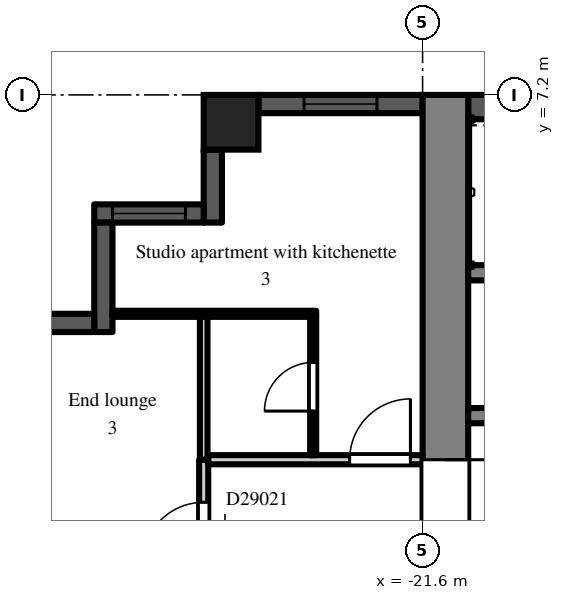
"""IFC4 building model, lengths in metres.
Left out: names, types, materials, properties, quantities, classifications, styles, units other than length and angle.
Written with IfcOpenShell. Run it as: python <this file> out.ifc"""

import sys

from ifc_helpers import new_model, si_unit, direction, frame, frame_2d, origin, origin_2d, place, context, subcontext, project, spatial, rectangle, extrude, element, fill, save


model = new_model("IFC4")
c1 = context("Model", 3, precision=1e-05, world=origin(), true_north=direction((0.0, 1.0)))
c2 = subcontext(c1, "Body", "Model", "MODEL_VIEW")
j1 = project(units=[si_unit("LENGTHUNIT", "METRE"), si_unit("PLANEANGLEUNIT", "RADIAN")], contexts=[c1])
p1 = place(None, origin())
s1 = spatial("IfcSite", under=j1, at=p1, CompositionType="ELEMENT")
p2 = place(p1, origin())
s2 = spatial("IfcBuilding", under=s1, at=p2, CompositionType="ELEMENT")
p3 = place(p2, frame((0.0, 0.0, 201.9)))
s3 = spatial("IfcBuildingStorey", under=s2, at=p3, CompositionType="ELEMENT", Elevation=201.9)
p4 = place(p3, frame((-24.75, 6.75, 0.0), z_axis=(0.0, 0.0, 1.0), x_axis=(1.0, 0.0, 0.0)))
e1 = element("IfcColumn", 1, at=p4, inside=s3, PredefinedType="COLUMN", context=c2, shape_type="SweptSolid", body=[
    extrude(rectangle(XDim=0.9, YDim=0.9, at=origin_2d()), origin(), (0.0, 0.0, 1.0), 3.0),
])
p5 = place(p3, frame((-21.6, 7.05, 0.0), z_axis=(0.0, 0.0, 1.0), x_axis=(-1.0, 0.0, 0.0)))
e2 = element("IfcWall", 2, at=p5, inside=s3, PredefinedType="SOLIDWALL", context=c2, shape_type="SweptSolid", body=[
    extrude(rectangle(XDim=2.7, YDim=0.3, at=frame_2d((1.35, 0.0))), origin(), (0.0, 0.0, 1.0), 2.3),
])
p6 = place(p5, frame((0.75, 0.0, 0.2)))
e3 = element("IfcOpeningElement", 3, at=p6, cuts=e2, PredefinedType="OPENING", context=c2, shape_type="SweptSolid", body=[
    extrude(rectangle(XDim=1.2, YDim=1.85, at=frame_2d((0.6, 0.925))), frame((0.0, 0.16, 0.0), z_axis=(0.0, -1.0, 0.0), x_axis=(1.0, 0.0, 0.0)), (0.0, 0.0, 1.0), 0.32),
])
p7 = place(p3, frame((-25.05, 6.3, 0.0), z_axis=(0.0, 0.0, 1.0), x_axis=(0.0, -1.0, 0.0)))
e4 = element("IfcWall", 4, at=p7, inside=s3, PredefinedType="SOLIDWALL", context=c2, shape_type="SweptSolid", body=[
    extrude(rectangle(XDim=1.2, YDim=0.3, at=frame_2d((0.6, 0.0))), origin(), (0.0, 0.0, 1.0), 2.6),
])
p8 = place(p3, frame((-25.2, 5.25, 0.0), z_axis=(0.0, 0.0, 1.0), x_axis=(-1.0, 0.0, 0.0)))
e5 = element("IfcWall", 5, at=p8, inside=s3, PredefinedType="SOLIDWALL", context=c2, shape_type="SweptSolid", body=[
    extrude(rectangle(XDim=1.8, YDim=0.3, at=frame_2d((0.9, 0.0))), origin(), (0.0, 0.0, 1.0), 2.6),
])
p9 = place(p8, frame((0.3, 0.0, 0.2)))
e6 = element("IfcOpeningElement", 6, at=p9, cuts=e5, PredefinedType="OPENING", context=c2, shape_type="SweptSolid", body=[
    extrude(rectangle(XDim=1.2, YDim=1.85, at=frame_2d((0.6, 0.925))), frame((0.0, 0.16, 0.0), z_axis=(0.0, -1.0, 0.0), x_axis=(1.0, 0.0, 0.0)), (0.0, 0.0, 1.0), 0.32),
])
p10 = place(p3, frame((-26.85, 5.1, 0.0), z_axis=(0.0, 0.0, 1.0), x_axis=(0.0, -1.0, 0.0)))
e7 = element("IfcWall", 7, at=p10, inside=s3, PredefinedType="SOLIDWALL", context=c2, shape_type="SweptSolid", body=[
    extrude(rectangle(XDim=1.8, YDim=0.3, at=frame_2d((0.9, 0.0))), origin(), (0.0, 0.0, 1.0), 2.6),
])
p11 = place(p3, frame((-27.0, 3.45, 0.0), z_axis=(0.0, 0.0, 1.0), x_axis=(-1.0, 0.0, 0.0)))
e8 = element("IfcWall", 8, at=p11, inside=s3, PredefinedType="SOLIDWALL", context=c2, shape_type="SweptSolid", body=[
    extrude(rectangle(XDim=0.9, YDim=0.3, at=frame_2d((0.45, 0.0))), origin(), (0.0, 0.0, 1.0), 2.6),
])
p12 = place(p3, frame((-21.225, -7.2, 0.0), z_axis=(0.0, 0.0, 1.0), x_axis=(0.0, 1.0, 0.0)))
e9 = element("IfcWall", 9, at=p12, inside=s3, PredefinedType="SHEAR", context=c2, shape_type="SweptSolid", body=[
    extrude(rectangle(XDim=14.4, YDim=0.75, at=frame_2d((7.2, 0.0))), origin(), (0.0, 0.0, 1.0), 2.6),
])
p13 = place(p12, frame((6.0, 0.0, 0.0)))
e10 = element("IfcOpeningElement", 10, at=p13, cuts=e9, PredefinedType="OPENING", context=c2, shape_type="SweptSolid", body=[
    extrude(rectangle(XDim=2.4, YDim=2.2, at=frame_2d((1.2, 1.1))), frame((0.0, 0.385, 0.0), z_axis=(0.0, -1.0, 0.0), x_axis=(1.0, 0.0, 0.0)), (0.0, 0.0, 1.0), 0.77),
])
p14 = place(p3, frame((-7.9, 7.0, 0.0), z_axis=(0.0, 0.0, 1.0), x_axis=(-1.0, 0.0, 0.0)))
e11 = element("IfcWall", 11, at=p14, inside=s3, PredefinedType="SHEAR", context=c2, shape_type="SweptSolid", body=[
    extrude(rectangle(XDim=12.95, YDim=0.4, at=frame_2d((6.475, 0.0))), origin(), (0.0, 0.0, 1.0), 2.6),
])
p15 = place(p3, frame((-7.9, 1.925, 0.0), z_axis=(0.0, 0.0, 1.0), x_axis=(-1.0, 0.0, 0.0)))
e12 = element("IfcWall", 12, at=p15, inside=s3, PredefinedType="SHEAR", context=c2, shape_type="SweptSolid", body=[
    extrude(rectangle(XDim=12.95, YDim=0.25, at=frame_2d((6.475, 0.0))), origin(), (0.0, 0.0, 1.0), 2.6),
])
p16 = place(p15, frame((4.825, 0.0, 0.0)))
e13 = element("IfcOpeningElement", 13, at=p16, cuts=e12, PredefinedType="OPENING", context=c2, shape_type="SweptSolid", body=[
    extrude(rectangle(XDim=1.1, YDim=2.1, at=frame_2d((0.55, 1.05))), frame((0.0, 0.135, 0.0), z_axis=(0.0, -1.0, 0.0), x_axis=(1.0, 0.0, 0.0)), (0.0, 0.0, 1.0), 0.27),
])
p17 = place(p15, frame((7.025, 0.0, 0.0)))
e14 = element("IfcOpeningElement", 14, at=p17, cuts=e12, PredefinedType="OPENING", context=c2, shape_type="SweptSolid", body=[
    extrude(rectangle(XDim=1.1, YDim=2.1, at=frame_2d((0.55, 1.05))), frame((0.0, 0.135, 0.0), z_axis=(0.0, -1.0, 0.0), x_axis=(1.0, 0.0, 0.0)), (0.0, 0.0, 1.0), 0.27),
])
p18 = place(p15, frame((9.225, 0.0, 0.0)))
e15 = element("IfcOpeningElement", 15, at=p18, cuts=e12, PredefinedType="OPENING", context=c2, shape_type="SweptSolid", body=[
    extrude(rectangle(XDim=1.1, YDim=2.1, at=frame_2d((0.55, 1.05))), frame((0.0, 0.135, 0.0), z_axis=(0.0, -1.0, 0.0), x_axis=(1.0, 0.0, 0.0)), (0.0, 0.0, 1.0), 0.27),
])
p19 = place(p15, frame((0.525, 0.0, 0.0)))
e16 = element("IfcOpeningElement", 16, at=p19, cuts=e12, PredefinedType="OPENING", context=c2, shape_type="SweptSolid", body=[
    extrude(rectangle(XDim=0.9, YDim=2.1, at=frame_2d((0.45, 1.05))), frame((0.0, 0.135, 0.0), z_axis=(0.0, -1.0, 0.0), x_axis=(1.0, 0.0, 0.0)), (0.0, 0.0, 1.0), 0.27),
])
p20 = place(p15, frame((2.625, 0.0, 0.0)))
e17 = element("IfcOpeningElement", 17, at=p20, cuts=e12, PredefinedType="OPENING", context=c2, shape_type="SweptSolid", body=[
    extrude(rectangle(XDim=1.1, YDim=2.1, at=frame_2d((0.55, 1.05))), frame((0.0, 0.135, 0.0), z_axis=(0.0, -1.0, 0.0), x_axis=(1.0, 0.0, 0.0)), (0.0, 0.0, 1.0), 0.27),
])
p21 = place(p15, frame((11.525, 0.0, 0.0)))
e18 = element("IfcOpeningElement", 18, at=p21, cuts=e12, PredefinedType="OPENING", context=c2, shape_type="SweptSolid", body=[
    extrude(rectangle(XDim=0.9, YDim=2.1, at=frame_2d((0.45, 1.05))), frame((0.0, 0.135, 0.0), z_axis=(0.0, -1.0, 0.0), x_axis=(1.0, 0.0, 0.0)), (0.0, 0.0, 1.0), 0.27),
])
p22 = place(p3, frame((-12.3, 4.275, 0.0), z_axis=(0.0, 0.0, 1.0), x_axis=(-1.0, 0.0, 0.0)))
e19 = element("IfcWall", 19, at=p22, inside=s3, PredefinedType="SHEAR", context=c2, shape_type="SweptSolid", body=[
    extrude(rectangle(XDim=8.55, YDim=0.25, at=frame_2d((4.275, 0.0))), origin(), (0.0, 0.0, 1.0), 2.6),
])
p23 = place(p3, frame((-26.7, 3.6, 0.0), z_axis=(0.0, 0.0, 1.0), x_axis=(1.0, 0.0, 0.0)))
e20 = element("IfcWall", 20, at=p23, inside=s3, PredefinedType="PARTITIONING", context=c2, shape_type="SweptSolid", body=[
    extrude(rectangle(XDim=3.35, YDim=0.1, at=frame_2d((1.675, 0.0))), origin(), (0.0, 0.0, 1.0), 2.6),
])
p24 = place(p3, frame((-25.2, -1.2, 0.0), z_axis=(0.0, 0.0, 1.0), x_axis=(0.0, 1.0, 0.0)))
e21 = element("IfcWall", 21, at=p24, inside=s3, PredefinedType="PARTITIONING", context=c2, shape_type="SweptSolid", body=[
    extrude(rectangle(XDim=2.4, YDim=0.15, at=frame_2d((1.2, 0.0))), origin(), (0.0, 0.0, 1.0), 2.6),
])
p25 = place(p24, frame((0.7, 0.0, 0.0)))
e22 = element("IfcOpeningElement", 22, at=p25, cuts=e21, PredefinedType="OPENING", context=c2, shape_type="SweptSolid", body=[
    extrude(rectangle(XDim=1.0, YDim=2.1, at=frame_2d((0.5, 1.05))), frame((0.0, 0.085, 0.0), z_axis=(0.0, -1.0, 0.0), x_axis=(1.0, 0.0, 0.0)), (0.0, 0.0, 1.0), 0.17),
])
p26 = place(p3, frame((-25.2, 1.2, 0.0), z_axis=(0.0, 0.0, 1.0), x_axis=(0.0, 1.0, 0.0)))
e23 = element("IfcWall", 23, at=p26, inside=s3, PredefinedType="PARTITIONING", context=c2, shape_type="SweptSolid", body=[
    extrude(rectangle(XDim=2.35, YDim=0.125, at=frame_2d((1.175, 0.0))), origin(), (0.0, 0.0, 1.0), 2.6),
])
p27 = place(p3, frame((-25.125, 1.2, 0.0), z_axis=(0.0, 0.0, 1.0), x_axis=(1.0, 0.0, 0.0)))
e24 = element("IfcWall", 24, at=p27, inside=s3, PredefinedType="PARTITIONING", context=c2, shape_type="SweptSolid", body=[
    extrude(rectangle(XDim=3.525, YDim=0.15, at=frame_2d((1.762, 0.0))), origin(), (0.0, 0.0, 1.0), 2.6),
])
p28 = place(p27, frame((2.325, 0.0, 0.0)))
e25 = element("IfcOpeningElement", 25, at=p28, cuts=e24, PredefinedType="OPENING", context=c2, shape_type="SweptSolid", body=[
    extrude(rectangle(XDim=1.0, YDim=2.1, at=frame_2d((0.5, 1.05))), frame((0.0, 0.085, 0.0), z_axis=(0.0, -1.0, 0.0), x_axis=(1.0, 0.0, 0.0)), (0.0, 0.0, 1.0), 0.17),
])
p29 = place(p3, frame((-23.4, 1.275, 0.0), z_axis=(0.0, 0.0, 1.0), x_axis=(0.0, 1.0, 0.0)))
e26 = element("IfcWall", 26, at=p29, inside=s3, PredefinedType="PARTITIONING", context=c2, shape_type="SweptSolid", body=[
    extrude(rectangle(XDim=2.275, YDim=0.1, at=frame_2d((1.138, 0.0))), origin(), (0.0, 0.0, 1.0), 2.6),
])
p30 = place(p29, frame((0.725, 0.0, 0.0)))
e27 = element("IfcOpeningElement", 27, at=p30, cuts=e26, PredefinedType="OPENING", context=c2, shape_type="SweptSolid", body=[
    extrude(rectangle(XDim=0.8, YDim=2.1, at=frame_2d((0.4, 1.05))), frame((0.0, 0.06, 0.0), z_axis=(0.0, -1.0, 0.0), x_axis=(1.0, 0.0, 0.0)), (0.0, 0.0, 1.0), 0.12),
])
p31 = place(p6, origin())
e28 = element("IfcWindow", 28, at=p31, inside=s3, PartitioningType="SINGLE_PANEL", PredefinedType="WINDOW", context=c2, shape_type="SweptSolid", body=[
    extrude(rectangle(XDim=1.2, YDim=1.85, at=frame_2d((0.6, 0.925))), frame((0.0, 0.03, 0.0), z_axis=(0.0, -1.0, 0.0), x_axis=(1.0, 0.0, 0.0)), (0.0, 0.0, 1.0), 0.06),
])
fill(e3, e28)
p32 = place(p9, origin())
e29 = element("IfcWindow", 29, at=p32, inside=s3, PartitioningType="SINGLE_PANEL", PredefinedType="WINDOW", context=c2, shape_type="SweptSolid", body=[
    extrude(rectangle(XDim=1.2, YDim=1.85, at=frame_2d((0.6, 0.925))), frame((0.0, 0.03, 0.0), z_axis=(0.0, -1.0, 0.0), x_axis=(1.0, 0.0, 0.0)), (0.0, 0.0, 1.0), 0.06),
])
fill(e6, e29)
p33 = place(p13, frame((2.4, 0.0, 0.0), z_axis=(0.0, 0.0, 1.0), x_axis=(-1.0, 0.0, 0.0)))
e30 = element("IfcDoor", 30, at=p33, inside=s3, OperationType="DOUBLE_DOOR_DOUBLE_SWING", PredefinedType="DOOR", context=c2, shape_type="SweptSolid", body=[
    extrude(rectangle(XDim=2.4, YDim=2.2, at=frame_2d((1.2, 1.1))), frame((0.0, 0.025, 0.0), z_axis=(0.0, -1.0, 0.0), x_axis=(1.0, 0.0, 0.0)), (0.0, 0.0, 1.0), 0.05),
])
fill(e10, e30)
p34 = place(p25, origin())
e31 = element("IfcDoor", 31, at=p34, inside=s3, OperationType="SINGLE_SWING_LEFT", PredefinedType="DOOR", context=c2, shape_type="SweptSolid", body=[
    extrude(rectangle(XDim=1.0, YDim=2.1, at=frame_2d((0.5, 1.05))), frame((0.0, 0.025, 0.0), z_axis=(0.0, -1.0, 0.0), x_axis=(1.0, 0.0, 0.0)), (0.0, 0.0, 1.0), 0.05),
])
fill(e22, e31)
p35 = place(p30, origin())
e32 = element("IfcDoor", 32, at=p35, inside=s3, OperationType="SINGLE_SWING_LEFT", PredefinedType="DOOR", context=c2, shape_type="SweptSolid", body=[
    extrude(rectangle(XDim=0.8, YDim=2.1, at=frame_2d((0.4, 1.05))), frame((0.0, 0.025, 0.0), z_axis=(0.0, -1.0, 0.0), x_axis=(1.0, 0.0, 0.0)), (0.0, 0.0, 1.0), 0.05),
])
fill(e27, e32)
p36 = place(p28, origin())
e33 = element("IfcDoor", 33, at=p36, inside=s3, OperationType="SINGLE_SWING_RIGHT", PredefinedType="DOOR", context=c2, shape_type="SweptSolid", body=[
    extrude(rectangle(XDim=1.0, YDim=2.1, at=frame_2d((0.5, 1.05))), frame((0.0, 0.025, 0.0), z_axis=(0.0, -1.0, 0.0), x_axis=(1.0, 0.0, 0.0)), (0.0, 0.0, 1.0), 0.05),
])
fill(e25, e33)
save(model, sys.argv[1])
